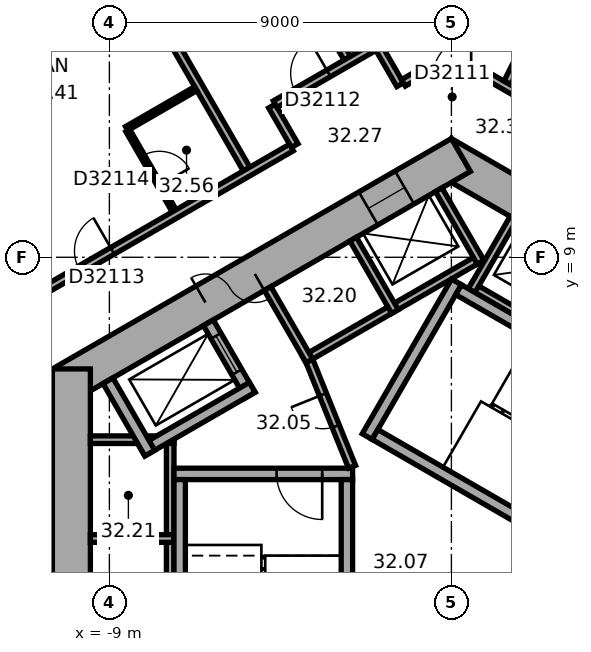
"""IFC4 building model, lengths in metres.
Left out: names, types, materials, properties, quantities, classifications, styles, units other than length and angle.
Written with IfcOpenShell. Run it as: python <this file> out.ifc"""

import sys

from ifc_helpers import new_model, si_unit, direction, frame, frame_2d, origin, place, context, subcontext, project, spatial, rectangle, extrude, element, fill, save


model = new_model("IFC4")
c1 = context("Model", 3, precision=1e-05, world=origin(), true_north=direction((0.0, 1.0)))
c2 = subcontext(c1, "Body", "Model", "MODEL_VIEW")
j1 = project(units=[si_unit("LENGTHUNIT", "METRE"), si_unit("PLANEANGLEUNIT", "RADIAN")], contexts=[c1])
p1 = place(None, origin())
s1 = spatial("IfcSite", under=j1, at=p1, CompositionType="ELEMENT")
p2 = place(p1, origin())
s2 = spatial("IfcBuilding", under=s1, at=p2, CompositionType="ELEMENT")
p3 = place(p2, frame((0.0, 0.0, 131.8)))
s3 = spatial("IfcBuildingStorey", under=s2, at=p3, CompositionType="ELEMENT", Elevation=131.8)
p4 = place(p3, frame((10.25, 5.629, 0.0), z_axis=(0.0, 0.0, 1.0), x_axis=(-0.866022616891, 0.50000482701, 0.0)))
e1 = element("IfcWall", 1, at=p4, inside=s3, PredefinedType="SHEAR", context=c2, shape_type="SweptSolid", body=[
    extrude(rectangle(XDim=12.125, YDim=1.0, at=frame_2d((6.062, 0.0))), origin(), (0.0, 0.0, 1.0), 3.7),
])
p5 = place(p4, frame((2.612, 0.0, 0.0)))
e2 = element("IfcOpeningElement", 2, at=p5, cuts=e1, PredefinedType="OPENING", context=c2, shape_type="SweptSolid", body=[
    extrude(rectangle(XDim=1.1, YDim=2.1, at=frame_2d((0.55, 1.05))), frame((0.0, 0.51, 0.0), z_axis=(0.0, -1.0, 0.0), x_axis=(1.0, 0.0, 0.0)), (0.0, 0.0, 1.0), 1.02),
])
p6 = place(p4, frame((5.212, 0.0, 0.0)))
e3 = element("IfcOpeningElement", 3, at=p6, cuts=e1, PredefinedType="OPENING", context=c2, shape_type="SweptSolid", body=[
    extrude(rectangle(XDim=1.1, YDim=2.1, at=frame_2d((0.55, 1.05))), frame((0.0, 0.51, 0.0), z_axis=(0.0, -1.0, 0.0), x_axis=(1.0, 0.0, 0.0)), (0.0, 0.0, 1.0), 1.02),
])
p7 = place(p4, frame((7.812, 0.0, 0.0)))
e4 = element("IfcOpeningElement", 4, at=p7, cuts=e1, PredefinedType="OPENING", context=c2, shape_type="SweptSolid", body=[
    extrude(rectangle(XDim=1.1, YDim=2.1, at=frame_2d((0.55, 1.05))), frame((0.0, 0.51, 0.0), z_axis=(0.0, -1.0, 0.0), x_axis=(1.0, 0.0, 0.0)), (0.0, 0.0, 1.0), 1.02),
])
p8 = place(p3, frame((0.25, 11.691, 0.0), z_axis=(0.0, 0.0, 1.0), x_axis=(-0.866022616891, -0.50000482701, 0.0)))
e5 = element("IfcWall", 5, at=p8, inside=s3, PredefinedType="SHEAR", context=c2, shape_type="SweptSolid", body=[
    extrude(rectangle(XDim=12.125, YDim=1.0, at=frame_2d((6.062, 0.0))), origin(), (0.0, 0.0, 1.0), 3.7),
])
p9 = place(p8, frame((6.262, 0.0, 0.0)))
e6 = element("IfcOpeningElement", 6, at=p9, cuts=e5, PredefinedType="OPENING", context=c2, shape_type="SweptSolid", body=[
    extrude(rectangle(XDim=1.5, YDim=2.1, at=frame_2d((0.75, 1.05))), frame((0.0, 0.51, 0.0), z_axis=(0.0, -1.0, 0.0), x_axis=(1.0, 0.0, 0.0)), (0.0, 0.0, 1.0), 1.02),
])
p10 = place(p8, frame((1.712, 0.0, 0.0)))
e7 = element("IfcOpeningElement", 7, at=p10, cuts=e5, PredefinedType="OPENING", context=c2, shape_type="SweptSolid", body=[
    extrude(rectangle(XDim=1.1, YDim=2.1, at=frame_2d((0.55, 1.05))), frame((0.0, 0.51, 0.0), z_axis=(0.0, -1.0, 0.0), x_axis=(1.0, 0.0, 0.0)), (0.0, 0.0, 1.0), 1.02),
])
p11 = place(p3, frame((-10.0, 6.062, 0.0), z_axis=(0.0, 0.0, 1.0), x_axis=(0.0, -1.0, 0.0)))
e8 = element("IfcWall", 8, at=p11, inside=s3, PredefinedType="SHEAR", context=c2, shape_type="SweptSolid", body=[
    extrude(rectangle(XDim=12.125, YDim=1.0, at=frame_2d((6.062, 0.0))), origin(), (0.0, 0.0, 1.0), 3.7),
])
p12 = place(p11, frame((6.612, 0.0, 0.0)))
e9 = element("IfcOpeningElement", 9, at=p12, cuts=e8, PredefinedType="OPENING", context=c2, shape_type="SweptSolid", body=[
    extrude(rectangle(XDim=0.9, YDim=2.1, at=frame_2d((0.45, 1.05))), frame((0.0, 0.51, 0.0), z_axis=(0.0, -1.0, 0.0), x_axis=(1.0, 0.0, 0.0)), (0.0, 0.0, 1.0), 1.02),
])
p13 = place(p3, frame((-2.961, 23.405, 0.0), z_axis=(0.0, 0.0, 1.0), x_axis=(-0.866023315909, -0.500003616288, 0.0)))
e10 = element("IfcWall", 10, at=p13, inside=s3, PredefinedType="STANDARD", context=c2, shape_type="SweptSolid", body=[
    extrude(rectangle(XDim=20.044, YDim=0.2, at=frame_2d((10.022, 0.0))), origin(), (0.0, 0.0, 1.0), 3.7),
])
p14 = place(p13, frame((1.314, 0.0, 0.9)))
e11 = element("IfcOpeningElement", 11, at=p14, cuts=e10, PredefinedType="OPENING", context=c2, shape_type="SweptSolid", body=[
    extrude(rectangle(XDim=2.4, YDim=2.0, at=frame_2d((1.2, 1.0))), frame((0.0, 0.11, 0.0), z_axis=(0.0, -1.0, 0.0), x_axis=(1.0, 0.0, 0.0)), (0.0, 0.0, 1.0), 0.22),
])
p15 = place(p13, frame((5.069, 0.0, 0.9)))
e12 = element("IfcOpeningElement", 12, at=p15, cuts=e10, PredefinedType="OPENING", context=c2, shape_type="SweptSolid", body=[
    extrude(rectangle(XDim=2.4, YDim=2.0, at=frame_2d((1.2, 1.0))), frame((0.0, 0.11, 0.0), z_axis=(0.0, -1.0, 0.0), x_axis=(1.0, 0.0, 0.0)), (0.0, 0.0, 1.0), 0.22),
])
p16 = place(p13, frame((8.823, 0.0, 0.9)))
e13 = element("IfcOpeningElement", 13, at=p16, cuts=e10, PredefinedType="OPENING", context=c2, shape_type="SweptSolid", body=[
    extrude(rectangle(XDim=2.4, YDim=2.0, at=frame_2d((1.2, 1.0))), frame((0.0, 0.11, 0.0), z_axis=(0.0, -1.0, 0.0), x_axis=(1.0, 0.0, 0.0)), (0.0, 0.0, 1.0), 0.22),
])
p17 = place(p13, frame((12.577, 0.0, 0.9)))
e14 = element("IfcOpeningElement", 14, at=p17, cuts=e10, PredefinedType="OPENING", context=c2, shape_type="SweptSolid", body=[
    extrude(rectangle(XDim=2.4, YDim=2.0, at=frame_2d((1.2, 1.0))), frame((0.0, 0.11, 0.0), z_axis=(0.0, -1.0, 0.0), x_axis=(1.0, 0.0, 0.0)), (0.0, 0.0, 1.0), 0.22),
])
p18 = place(p13, frame((16.331, 0.0, 0.9)))
e15 = element("IfcOpeningElement", 15, at=p18, cuts=e10, PredefinedType="OPENING", context=c2, shape_type="SweptSolid", body=[
    extrude(rectangle(XDim=2.4, YDim=2.0, at=frame_2d((1.2, 1.0))), frame((0.0, 0.11, 0.0), z_axis=(0.0, -1.0, 0.0), x_axis=(1.0, 0.0, 0.0)), (0.0, 0.0, 1.0), 0.22),
])
p19 = place(p3, frame((7.424, 4.259, 0.0), z_axis=(0.0, 0.0, 1.0), x_axis=(-0.866026010844, 0.49999894854, 0.0)))
e16 = element("IfcWall", 16, at=p19, inside=s3, PredefinedType="PARTITIONING", context=c2, shape_type="SweptSolid", body=[
    extrude(rectangle(XDim=8.0, YDim=0.2, at=frame_2d((4.0, 0.0))), origin(), (0.0, 0.0, 1.0), 3.42),
])
p20 = place(p3, frame((0.532, 8.122, 0.0), z_axis=(0.0, 0.0, 1.0), x_axis=(0.500077893725, 0.86598042715, 0.0)))
e17 = element("IfcWall", 17, at=p20, inside=s3, PredefinedType="PARTITIONING", context=c2, shape_type="SweptSolid", body=[
    extrude(rectangle(XDim=2.2, YDim=0.2, at=frame_2d((1.1, 0.0))), origin(), (0.0, 0.0, 1.0), 3.42),
])
p21 = place(p3, frame((0.803, 9.009, 0.0), z_axis=(0.0, 0.0, 1.0), x_axis=(-0.866028230842, -0.499995103361, 0.0)))
e18 = element("IfcWall", 18, at=p21, inside=s3, PredefinedType="PARTITIONING", context=c2, shape_type="SweptSolid", body=[
    extrude(rectangle(XDim=5.4, YDim=0.2, at=frame_2d((2.7, 0.0))), origin(), (0.0, 0.0, 1.0), 3.42),
])
p22 = place(p3, frame((0.767, 8.872, 0.0), z_axis=(0.0, 0.0, 1.0), x_axis=(-0.499994660107, 0.866028486751, 0.0)))
e19 = element("IfcWall", 19, at=p22, inside=s3, PredefinedType="PARTITIONING", context=c2, shape_type="SweptSolid", body=[
    extrude(rectangle(XDim=2.2, YDim=0.2, at=frame_2d((1.1, 0.0))), origin(), (0.0, 0.0, 1.0), 3.42),
])
for number, where, z_axis, x_axis in (
    (20, (-1.485, 7.572, 0.0), (0.0, 0.0, 1.0), (-0.5, 0.866, 0.0)),
    (21, (-3.737, 6.272, 0.0), (0.0, 0.0, 1.0), (-0.5, 0.866, 0.0)),
):
    element("IfcWall", number, at=place(p3, frame(where, z_axis=z_axis, x_axis=x_axis)), inside=s3, PredefinedType="PARTITIONING", context=c2, shape_type="SweptSolid", body=[
        extrude(rectangle(XDim=2.2, YDim=0.2, at=frame_2d((1.1, 0.0))), origin(), (0.0, 0.0, 1.0), 3.42),
    ])
p23 = place(p3, frame((-7.4, 4.3, 0.0), z_axis=(0.0, 0.0, 1.0), x_axis=(0.0, -1.0, 0.0)))
e22 = element("IfcWall", 22, at=p23, inside=s3, PredefinedType="PARTITIONING", context=c2, shape_type="SweptSolid", body=[
    extrude(rectangle(XDim=8.0, YDim=0.2, at=frame_2d((4.0, 0.0))), origin(), (0.0, 0.0, 1.0), 3.42),
])
for number, where, z_axis, x_axis in (
    (23, (-7.3, 4.2, 0.0), (0.0, 0.0, 1.0), (-1.0, 0.0, 0.0)),
    (24, (-7.3, 1.6, 0.0), (0.0, 0.0, 1.0), (-1.0, 0.0, 0.0)),
):
    element("IfcWall", number, at=place(p3, frame(where, z_axis=z_axis, x_axis=x_axis)), inside=s3, PredefinedType="PARTITIONING", context=c2, shape_type="SweptSolid", body=[
        extrude(rectangle(XDim=2.2, YDim=0.2, at=frame_2d((1.1, 0.0))), origin(), (0.0, 0.0, 1.0), 3.42),
    ])
p24 = place(p3, frame((-2.216, 4.282, 0.0), z_axis=(0.0, 0.0, 1.0), x_axis=(0.499977259774, 0.866038532462, 0.0)))
e25 = element("IfcWall", 25, at=p24, inside=s3, PredefinedType="SHEAR", context=c2, shape_type="SweptSolid", body=[
    extrude(rectangle(XDim=4.7, YDim=0.3, at=frame_2d((2.35, 0.0))), origin(), (0.0, 0.0, 1.0), 3.42),
])
for number, where, z_axis, x_axis in (
    (26, (4.103, 0.807, 0.0), (0.0, 0.0, 1.0), (-0.866, 0.5, 0.0)),
    (27, (6.303, 4.617, 0.0), (0.0, 0.0, 1.0), (-0.866, 0.5, 0.0)),
):
    element("IfcWall", number, at=place(p3, frame(where, z_axis=z_axis, x_axis=x_axis)), inside=s3, PredefinedType="SHEAR", context=c2, shape_type="SweptSolid", body=[
        extrude(rectangle(XDim=7.06, YDim=0.3, at=frame_2d((3.53, 0.0))), origin(), (0.0, 0.0, 1.0), 3.42),
    ])
p25 = place(p3, frame((-2.6, 3.3, 0.0), z_axis=(0.0, 0.0, 1.0), x_axis=(-1.0, 0.0, 0.0)))
e28 = element("IfcWall", 28, at=p25, inside=s3, PredefinedType="SHEAR", context=c2, shape_type="SweptSolid", body=[
    extrude(rectangle(XDim=4.7, YDim=0.3, at=frame_2d((2.35, 0.0))), origin(), (0.0, 0.0, 1.0), 3.42),
])
p26 = place(p25, frame((0.8, 0.0, 0.0)))
e29 = element("IfcOpeningElement", 29, at=p26, cuts=e28, PredefinedType="OPENING", context=c2, shape_type="SweptSolid", body=[
    extrude(rectangle(XDim=1.2, YDim=2.1, at=frame_2d((0.6, 1.05))), frame((0.0, 0.16, 0.0), z_axis=(0.0, -1.0, 0.0), x_axis=(1.0, 0.0, 0.0)), (0.0, 0.0, 1.0), 0.32),
])
for number, where, z_axis, x_axis in (
    (30, (-2.75, 3.15, 0.0), (0.0, 0.0, 1.0), (0.0, -1.0, 0.0)),
    (31, (-7.15, 3.15, 0.0), (0.0, 0.0, 1.0), (0.0, -1.0, 0.0)),
):
    element("IfcWall", number, at=place(p3, frame(where, z_axis=z_axis, x_axis=x_axis)), inside=s3, PredefinedType="SHEAR", context=c2, shape_type="SweptSolid", body=[
        extrude(rectangle(XDim=7.06, YDim=0.3, at=frame_2d((3.53, 0.0))), origin(), (0.0, 0.0, 1.0), 3.42),
    ])
p27 = place(p3, frame((-5.295, 5.372, 0.0), z_axis=(0.0, 0.0, 1.0), x_axis=(-0.500077893725, 0.86598042715, 0.0)))
e32 = element("IfcWall", 32, at=p27, inside=s3, PredefinedType="SHEAR", context=c2, shape_type="SweptSolid", body=[
    extrude(rectangle(XDim=2.2, YDim=0.3, at=frame_2d((1.1, 0.0))), origin(), (0.0, 0.0, 1.0), 3.42),
])
p28 = place(p27, frame((0.7, 0.0, 0.0)))
e33 = element("IfcOpeningElement", 33, at=p28, cuts=e32, PredefinedType="OPENING", context=c2, shape_type="SweptSolid", body=[
    extrude(rectangle(XDim=1.1, YDim=2.1, at=frame_2d((0.55, 1.05))), frame((0.0, 0.16, 0.0), z_axis=(0.0, -1.0, 0.0), x_axis=(1.0, 0.0, 0.0)), (0.0, 0.0, 1.0), 0.32),
])
p29 = place(p3, frame((-5.24, 5.577, 0.0), z_axis=(0.0, 0.0, 1.0), x_axis=(-0.866014461049, -0.500018952895, 0.0)))
e34 = element("IfcWall", 34, at=p29, inside=s3, PredefinedType="SHEAR", context=c2, shape_type="SweptSolid", body=[
    extrude(rectangle(XDim=3.35, YDim=0.3, at=frame_2d((1.675, 0.0))), origin(), (0.0, 0.0, 1.0), 3.42),
])
p30 = place(p3, frame((-7.937, 3.847, 0.0), z_axis=(0.0, 0.0, 1.0), x_axis=(-0.50002983664, 0.866008176907, 0.0)))
e35 = element("IfcWall", 35, at=p30, inside=s3, PredefinedType="SHEAR", context=c2, shape_type="SweptSolid", body=[
    extrude(rectangle(XDim=2.2, YDim=0.3, at=frame_2d((1.1, 0.0))), origin(), (0.0, 0.0, 1.0), 3.42),
])
p31 = place(p3, frame((-2.615, 3.487, 0.0), z_axis=(0.0, 0.0, 1.0), x_axis=(-0.373576831041, 0.92759924068, 0.0)))
e36 = element("IfcWall", 36, at=p31, inside=s3, PredefinedType="PARTITIONING", context=c2, shape_type="SweptSolid", body=[
    extrude(rectangle(XDim=3.002, YDim=0.2, at=frame_2d((1.501, 0.0))), origin(), (0.0, 0.0, 1.0), 3.42),
])
p32 = place(p31, frame((1.15, 0.0, 0.0)))
e37 = element("IfcOpeningElement", 37, at=p32, cuts=e36, PredefinedType="OPENING", context=c2, shape_type="SweptSolid", body=[
    extrude(rectangle(XDim=0.9, YDim=2.1, at=frame_2d((0.45, 1.05))), frame((0.0, 0.11, 0.0), z_axis=(0.0, -1.0, 0.0), x_axis=(1.0, 0.0, 0.0)), (0.0, 0.0, 1.0), 0.22),
])
p33 = place(p3, frame((-9.515, 18.466, 0.0), z_axis=(0.0, 0.0, 1.0), x_axis=(0.500009360108, -0.866019999656, 0.0)))
e38 = element("IfcWall", 38, at=p33, inside=s3, PredefinedType="PARTITIONING", context=c2, shape_type="SweptSolid", body=[
    extrude(rectangle(XDim=8.25, YDim=0.2, at=frame_2d((4.125, 0.0))), origin(), (0.0, 0.0, 1.0), 2.87),
])
p34 = place(p3, frame((-8.545, 12.387, 0.0), z_axis=(0.0, 0.0, 1.0), x_axis=(0.866009402589, 0.500027713859, 0.0)))
e39 = element("IfcWall", 39, at=p34, inside=s3, PredefinedType="PARTITIONING", context=c2, shape_type="SweptSolid", body=[
    extrude(rectangle(XDim=2.1, YDim=0.12, at=frame_2d((1.05, 0.0))), origin(), (0.0, 0.0, 1.0), 3.42),
])
p35 = place(p3, frame((-7.295, 10.222, 0.0), z_axis=(0.0, 0.0, 1.0), x_axis=(-0.500002508028, 0.866023955769, 0.0)))
e40 = element("IfcWall", 40, at=p35, inside=s3, PredefinedType="PARTITIONING", context=c2, shape_type="SweptSolid", body=[
    extrude(rectangle(XDim=2.44, YDim=0.12, at=frame_2d((1.22, 0.0))), origin(), (0.0, 0.0, 1.0), 3.42),
])
p36 = place(p35, frame((0.77, 0.0, 0.0)))
e41 = element("IfcOpeningElement", 41, at=p36, cuts=e40, PredefinedType="OPENING", context=c2, shape_type="SweptSolid", body=[
    extrude(rectangle(XDim=0.9, YDim=2.1, at=frame_2d((0.45, 1.05))), frame((0.0, 0.07, 0.0), z_axis=(0.0, -1.0, 0.0), x_axis=(1.0, 0.0, 0.0)), (0.0, 0.0, 1.0), 0.14),
])
p37 = place(p3, frame((-6.264, 20.344, 0.0), z_axis=(0.0, 0.0, 1.0), x_axis=(0.500009260695, -0.866020057054, 0.0)))
e42 = element("IfcWall", 42, at=p37, inside=s3, PredefinedType="PARTITIONING", context=c2, shape_type="SweptSolid", body=[
    extrude(rectangle(XDim=7.049, YDim=0.2, at=frame_2d((3.524, 0.0))), origin(), (0.0, 0.0, 1.0), 3.42),
])
p38 = place(p3, frame((-4.723, 12.978, 0.0), z_axis=(0.0, 0.0, 1.0), x_axis=(0.500074377092, -0.865982457891, 0.0)))
e43 = element("IfcWall", 43, at=p38, inside=s3, PredefinedType="PARTITIONING", context=c2, shape_type="SweptSolid", body=[
    extrude(rectangle(XDim=1.201, YDim=0.2, at=frame_2d((0.601, 0.0))), origin(), (0.0, 0.0, 1.0), 3.42),
])
p39 = place(p3, frame((-4.209, 11.888, 0.0), z_axis=(0.0, 0.0, 1.0), x_axis=(-0.866020930448, -0.500007747966, 0.0)))
e44 = element("IfcWall", 44, at=p39, inside=s3, PredefinedType="PARTITIONING", context=c2, shape_type="SweptSolid", body=[
    extrude(rectangle(XDim=8.321, YDim=0.2, at=frame_2d((4.161, 0.0))), origin(), (0.0, 0.0, 1.0), 3.42),
])
p40 = place(p39, frame((5.439, 0.0, 0.0)))
e45 = element("IfcOpeningElement", 45, at=p40, cuts=e44, PredefinedType="OPENING", context=c2, shape_type="SweptSolid", body=[
    extrude(rectangle(XDim=1.0, YDim=2.1, at=frame_2d((0.5, 1.05))), frame((0.0, 0.11, 0.0), z_axis=(0.0, -1.0, 0.0), x_axis=(1.0, 0.0, 0.0)), (0.0, 0.0, 1.0), 0.22),
])
p41 = place(p3, frame((-1.95, 14.579, 0.0), z_axis=(0.0, 0.0, 1.0), x_axis=(-0.866011260204, -0.500024496599, 0.0)))
e46 = element("IfcWall", 46, at=p41, inside=s3, PredefinedType="PARTITIONING", context=c2, shape_type="SweptSolid", body=[
    extrude(rectangle(XDim=3.102, YDim=0.2, at=frame_2d((1.551, 0.0))), origin(), (0.0, 0.0, 1.0), 3.42),
])
p42 = place(p41, frame((1.478, 0.0, 0.0)))
e47 = element("IfcOpeningElement", 47, at=p42, cuts=e46, PredefinedType="OPENING", context=c2, shape_type="SweptSolid", body=[
    extrude(rectangle(XDim=1.0, YDim=2.1, at=frame_2d((0.5, 1.05))), frame((0.0, 0.11, 0.0), z_axis=(0.0, -1.0, 0.0), x_axis=(1.0, 0.0, 0.0)), (0.0, 0.0, 1.0), 0.22),
])
p43 = place(p3, frame((-1.349, 13.539, 0.0), z_axis=(0.0, 0.0, 1.0), x_axis=(-0.500074377092, 0.865982457891, 0.0)))
e48 = element("IfcWall", 48, at=p43, inside=s3, PredefinedType="PARTITIONING", context=c2, shape_type="SweptSolid", body=[
    extrude(rectangle(XDim=1.101, YDim=0.2, at=frame_2d((0.55, 0.0))), origin(), (0.0, 0.0, 1.0), 3.42),
])
p44 = place(p3, frame((-0.95, 13.77, 0.0), z_axis=(0.0, 0.0, 1.0), x_axis=(-0.865904111586, -0.500210025428, 0.0)))
e49 = element("IfcWall", 49, at=p44, inside=s3, PredefinedType="PARTITIONING", context=c2, shape_type="SweptSolid", body=[
    extrude(rectangle(XDim=0.361, YDim=0.2, at=frame_2d((0.181, 0.0))), origin(), (0.0, 0.0, 1.0), 3.42),
])
p45 = place(p3, frame((0.95, 13.77, 0.0), z_axis=(0.0, 0.0, 1.0), x_axis=(-1.0, 0.0, 0.0)))
e50 = element("IfcWall", 50, at=p45, inside=s3, PredefinedType="PARTITIONING", context=c2, shape_type="SweptSolid", body=[
    extrude(rectangle(XDim=1.86, YDim=0.2, at=frame_2d((0.93, 0.0))), origin(), (0.0, 0.0, 1.0), 3.42),
])
p46 = place(p45, frame((0.43, 0.0, 0.0)))
e51 = element("IfcOpeningElement", 51, at=p46, cuts=e50, PredefinedType="OPENING", context=c2, shape_type="SweptSolid", body=[
    extrude(rectangle(XDim=1.0, YDim=2.1, at=frame_2d((0.5, 1.05))), frame((0.0, 0.11, 0.0), z_axis=(0.0, -1.0, 0.0), x_axis=(1.0, 0.0, 0.0)), (0.0, 0.0, 1.0), 0.22),
])
p47 = place(p3, frame((2.648, 12.789, 0.0), z_axis=(0.0, 0.0, 1.0), x_axis=(-0.8660607342, 0.499938800931, 0.0)))
e52 = element("IfcWall", 52, at=p47, inside=s3, PredefinedType="PARTITIONING", context=c2, shape_type="SweptSolid", body=[
    extrude(rectangle(XDim=1.921, YDim=0.2, at=frame_2d((0.96, 0.0))), origin(), (0.0, 0.0, 1.0), 3.42),
])
p48 = place(p3, frame((5.01, 20.688, 0.0), z_axis=(0.0, 0.0, 1.0), x_axis=(-0.446203062394, -0.894931744386, 0.0)))
e53 = element("IfcWall", 53, at=p48, inside=s3, PredefinedType="PARTITIONING", context=c2, shape_type="SweptSolid", body=[
    extrude(rectangle(XDim=7.927, YDim=0.2, at=frame_2d((3.963, 0.0))), origin(), (0.0, 0.0, 1.0), 2.87),
])
p49 = place(p9, origin())
e54 = element("IfcDoor", 54, at=p49, inside=s3, OperationType="DOUBLE_DOOR_SINGLE_SWING", PredefinedType="DOOR", context=c2, shape_type="SweptSolid", body=[
    extrude(rectangle(XDim=1.5, YDim=2.1, at=frame_2d((0.75, 1.05))), frame((0.0, 0.025, 0.0), z_axis=(0.0, -1.0, 0.0), x_axis=(1.0, 0.0, 0.0)), (0.0, 0.0, 1.0), 0.05),
])
fill(e6, e54)
p50 = place(p26, origin())
e55 = element("IfcDoor", 55, at=p50, inside=s3, OperationType="SINGLE_SWING_RIGHT", PredefinedType="DOOR", context=c2, shape_type="SweptSolid", body=[
    extrude(rectangle(XDim=1.2, YDim=2.1, at=frame_2d((0.6, 1.05))), frame((0.0, 0.025, 0.0), z_axis=(0.0, -1.0, 0.0), x_axis=(1.0, 0.0, 0.0)), (0.0, 0.0, 1.0), 0.05),
])
fill(e29, e55)
p51 = place(p32, origin())
e56 = element("IfcDoor", 56, at=p51, inside=s3, OperationType="SINGLE_SWING_LEFT", PredefinedType="DOOR", context=c2, shape_type="SweptSolid", body=[
    extrude(rectangle(XDim=0.9, YDim=2.1, at=frame_2d((0.45, 1.05))), frame((0.0, 0.025, 0.0), z_axis=(0.0, -1.0, 0.0), x_axis=(1.0, 0.0, 0.0)), (0.0, 0.0, 1.0), 0.05),
])
fill(e37, e56)
p52 = place(p28, origin())
e57 = element("IfcDoor", 57, at=p52, inside=s3, OperationType="DOUBLE_DOOR_SLIDING", PredefinedType="DOOR", context=c2, shape_type="SweptSolid", body=[
    extrude(rectangle(XDim=1.1, YDim=2.1, at=frame_2d((0.55, 1.05))), frame((0.0, 0.025, 0.0), z_axis=(0.0, -1.0, 0.0), x_axis=(1.0, 0.0, 0.0)), (0.0, 0.0, 1.0), 0.05),
])
fill(e33, e57)
p53 = place(p10, origin())
e58 = element("IfcDoor", 58, at=p53, inside=s3, OperationType="DOUBLE_DOOR_SLIDING", PredefinedType="DOOR", context=c2, shape_type="SweptSolid", body=[
    extrude(rectangle(XDim=1.1, YDim=2.1, at=frame_2d((0.55, 1.05))), frame((0.0, 0.025, 0.0), z_axis=(0.0, -1.0, 0.0), x_axis=(1.0, 0.0, 0.0)), (0.0, 0.0, 1.0), 0.05),
])
fill(e7, e58)
p54 = place(p46, origin())
e59 = element("IfcDoor", 59, at=p54, inside=s3, OperationType="SINGLE_SWING_LEFT", PredefinedType="DOOR", context=c2, shape_type="SweptSolid", body=[
    extrude(rectangle(XDim=1.0, YDim=2.1, at=frame_2d((0.5, 1.05))), frame((0.0, 0.025, 0.0), z_axis=(0.0, -1.0, 0.0), x_axis=(1.0, 0.0, 0.0)), (0.0, 0.0, 1.0), 0.05),
])
fill(e51, e59)
p55 = place(p42, origin())
e60 = element("IfcDoor", 60, at=p55, inside=s3, OperationType="SINGLE_SWING_LEFT", PredefinedType="DOOR", context=c2, shape_type="SweptSolid", body=[
    extrude(rectangle(XDim=1.0, YDim=2.1, at=frame_2d((0.5, 1.05))), frame((0.0, 0.025, 0.0), z_axis=(0.0, -1.0, 0.0), x_axis=(1.0, 0.0, 0.0)), (0.0, 0.0, 1.0), 0.05),
])
fill(e47, e60)
p56 = place(p40, origin())
e61 = element("IfcDoor", 61, at=p56, inside=s3, OperationType="SINGLE_SWING_LEFT", PredefinedType="DOOR", context=c2, shape_type="SweptSolid", body=[
    extrude(rectangle(XDim=1.0, YDim=2.1, at=frame_2d((0.5, 1.05))), frame((0.0, 0.025, 0.0), z_axis=(0.0, -1.0, 0.0), x_axis=(1.0, 0.0, 0.0)), (0.0, 0.0, 1.0), 0.05),
])
fill(e45, e61)
p57 = place(p36, origin())
e62 = element("IfcDoor", 62, at=p57, inside=s3, OperationType="SINGLE_SWING_LEFT", PredefinedType="DOOR", context=c2, shape_type="SweptSolid", body=[
    extrude(rectangle(XDim=0.9, YDim=2.1, at=frame_2d((0.45, 1.05))), frame((0.0, 0.025, 0.0), z_axis=(0.0, -1.0, 0.0), x_axis=(1.0, 0.0, 0.0)), (0.0, 0.0, 1.0), 0.05),
])
fill(e41, e62)
save(model, sys.argv[1])
